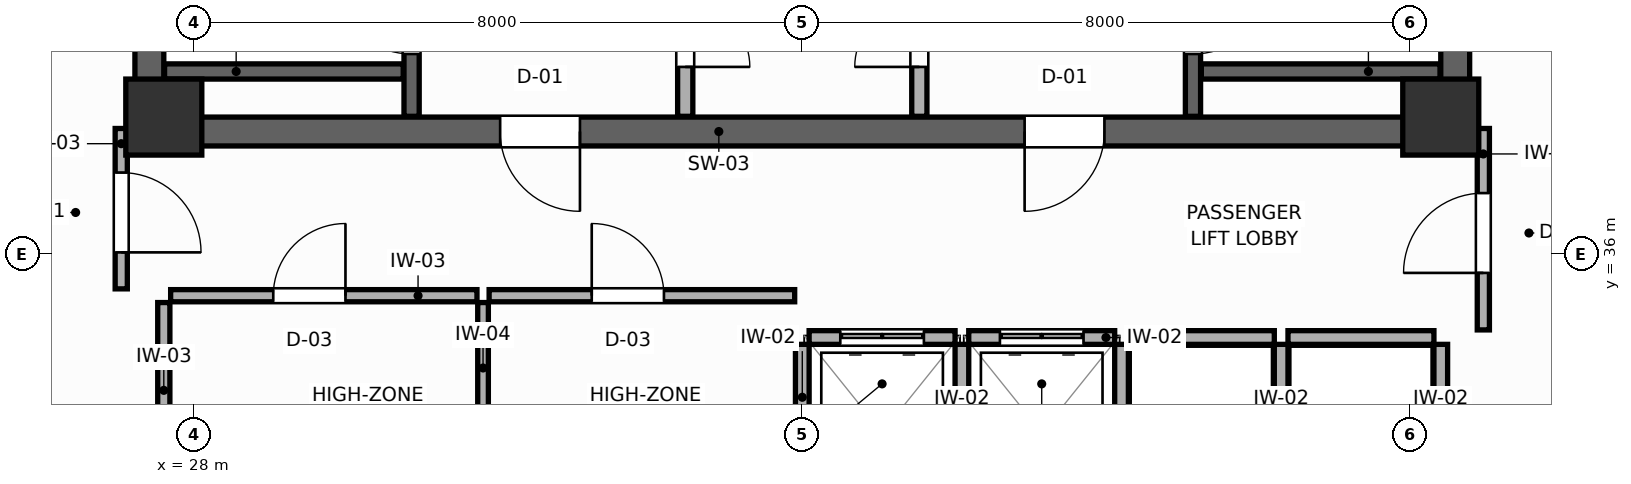
"""IFC4 building model, lengths in metres.
Left out: names, types, materials, properties, quantities, classifications, styles, units other than length and angle.
Written with IfcOpenShell. Run it as: python <this file> out.ifc"""

import sys

from ifc_helpers import new_model, si_unit, direction, frame, frame_2d, origin, origin_2d, place, context, subcontext, project, spatial, rectangle, extrude, source, transform, mapped, element, fill, save


model = new_model("IFC4")
c1 = context("Model", 3, precision=1e-05, world=origin(), true_north=direction((0.0, 1.0)))
c2 = subcontext(c1, "Body", "Model", "MODEL_VIEW")
j1 = project(units=[si_unit("LENGTHUNIT", "METRE"), si_unit("PLANEANGLEUNIT", "RADIAN")], contexts=[c1])
p1 = place(None, origin())
s1 = spatial("IfcSite", under=j1, at=p1, CompositionType="ELEMENT")
p2 = place(p1, origin())
s2 = spatial("IfcBuilding", under=s1, at=p2, CompositionType="ELEMENT")
p3 = place(p2, frame((0.0, 0.0, 220.2)))
s3 = spatial("IfcBuildingStorey", under=s2, at=p3, CompositionType="ELEMENT", Elevation=220.2)
p4 = place(p3, frame((27.22, 37.61, 0.0), z_axis=(0.0, 0.0, 1.0), x_axis=(1.0, 0.0, 0.0)))
e1 = element("IfcWall", 1, at=p4, inside=s3, PredefinedType="SHEAR", context=c2, shape_type="SweptSolid", body=[
    extrude(rectangle(XDim=17.56, YDim=0.38, at=frame_2d((8.78, 0.0))), origin(), (0.0, 0.0, 1.0), 3.6),
])
p5 = place(p4, frame((4.805, 0.0, 0.0)))
e2 = element("IfcOpeningElement", 2, at=p5, cuts=e1, PredefinedType="OPENING", context=c2, shape_type="SweptSolid", body=[
    extrude(rectangle(XDim=1.05, YDim=2.1, at=frame_2d((0.525, 1.05))), frame((0.0, 0.2, 0.0), z_axis=(0.0, -1.0, 0.0), x_axis=(1.0, 0.0, 0.0)), (0.0, 0.0, 1.0), 0.4),
])
p6 = place(p4, frame((11.705, 0.0, 0.0)))
e3 = element("IfcOpeningElement", 3, at=p6, cuts=e1, PredefinedType="OPENING", context=c2, shape_type="SweptSolid", body=[
    extrude(rectangle(XDim=1.05, YDim=2.1, at=frame_2d((0.525, 1.05))), frame((0.0, 0.2, 0.0), z_axis=(0.0, -1.0, 0.0), x_axis=(1.0, 0.0, 0.0)), (0.0, 0.0, 1.0), 0.4),
])
for number, where, z_axis, x_axis in (
    (4, (27.41, 37.8, 0.0), (0.0, 0.0, 1.0), (0.0, 1.0, 0.0)),
    (5, (44.59, 37.8, 0.0), (0.0, 0.0, 1.0), (0.0, 1.0, 0.0)),
):
    element("IfcWall", number, at=place(p3, frame(where, z_axis=z_axis, x_axis=x_axis)), inside=s3, PredefinedType="SHEAR", context=c2, shape_type="SweptSolid", body=[
        extrude(rectangle(XDim=9.0, YDim=0.38, at=frame_2d((4.5, 0.0))), origin(), (0.0, 0.0, 1.0), 3.6),
    ])
m1 = source(origin(), c2, "Body", "SweptSolid", [
    extrude(rectangle(XDim=1.0, YDim=1.0, at=origin_2d()), origin(), (0.0, 0.0, 1.0), 3.6),
])
for number, where, z_axis, x_axis in (
    (6, (27.6, 37.8, 0.0), (0.0, 0.0, 1.0), (1.0, 0.0, 0.0)),
    (7, (44.4, 37.8, 0.0), (0.0, 0.0, 1.0), (1.0, 0.0, 0.0)),
):
    element("IfcColumn", number, at=place(p3, frame(where, z_axis=z_axis, x_axis=x_axis)), inside=s3, PredefinedType="COLUMN", context=c2, shape_type="MappedRepresentation", body=[
        mapped(m1, transform((0.0, 0.0, 0.0), scale=1.0)),
    ])
p7 = place(p3, frame((30.86, 37.81, 0.0), z_axis=(0.0, 0.0, 1.0), x_axis=(0.0, 1.0, 0.0)))
e8 = element("IfcWall", 8, at=p7, inside=s3, PredefinedType="SHEAR", context=c2, shape_type="SweptSolid", body=[
    extrude(rectangle(XDim=8.98, YDim=0.2, at=frame_2d((4.49, 0.0))), origin(), (0.0, 0.0, 1.0), 3.6),
])
p8 = place(p7, frame((0.82, 0.0, 0.0)))
e9 = element("IfcOpeningElement", 9, at=p8, cuts=e8, PredefinedType="OPENING", context=c2, shape_type="SweptSolid", body=[
    extrude(rectangle(XDim=1.05, YDim=2.1, at=frame_2d((0.525, 1.05))), frame((0.0, 0.11, 0.0), z_axis=(0.0, -1.0, 0.0), x_axis=(1.0, 0.0, 0.0)), (0.0, 0.0, 1.0), 0.22),
])
p9 = place(p3, frame((27.61, 38.4, 0.0), z_axis=(0.0, 0.0, 1.0), x_axis=(1.0, 0.0, 0.0)))
e10 = element("IfcWall", 10, at=p9, inside=s3, PredefinedType="SHEAR", context=c2, shape_type="SweptSolid", body=[
    extrude(rectangle(XDim=3.14, YDim=0.2, at=frame_2d((1.57, 0.0))), origin(), (0.0, 0.0, 1.0), 3.6),
])
p10 = place(p3, frame((41.14, 37.81, 0.0), z_axis=(0.0, 0.0, 1.0), x_axis=(0.0, 1.0, 0.0)))
e11 = element("IfcWall", 11, at=p10, inside=s3, PredefinedType="SHEAR", context=c2, shape_type="SweptSolid", body=[
    extrude(rectangle(XDim=8.98, YDim=0.2, at=frame_2d((4.49, 0.0))), origin(), (0.0, 0.0, 1.0), 3.6),
])
p11 = place(p10, frame((0.82, 0.0, 0.0)))
e12 = element("IfcOpeningElement", 12, at=p11, cuts=e11, PredefinedType="OPENING", context=c2, shape_type="SweptSolid", body=[
    extrude(rectangle(XDim=1.05, YDim=2.1, at=frame_2d((0.525, 1.05))), frame((0.0, 0.11, 0.0), z_axis=(0.0, -1.0, 0.0), x_axis=(1.0, 0.0, 0.0)), (0.0, 0.0, 1.0), 0.22),
])
p12 = place(p3, frame((41.25, 38.4, 0.0), z_axis=(0.0, 0.0, 1.0), x_axis=(1.0, 0.0, 0.0)))
e13 = element("IfcWall", 13, at=p12, inside=s3, PredefinedType="SHEAR", context=c2, shape_type="SweptSolid", body=[
    extrude(rectangle(XDim=3.14, YDim=0.2, at=frame_2d((1.57, 0.0))), origin(), (0.0, 0.0, 1.0), 3.6),
])
p13 = place(p3, frame((34.46, 37.81, 0.0), z_axis=(0.0, 0.0, 1.0), x_axis=(0.0, 1.0, 0.0)))
e14 = element("IfcWall", 14, at=p13, inside=s3, PredefinedType="PARTITIONING", context=c2, shape_type="SweptSolid", body=[
    extrude(rectangle(XDim=8.98, YDim=0.2, at=frame_2d((4.49, 0.0))), origin(), (0.0, 0.0, 1.0), 3.41),
])
p14 = place(p13, frame((0.65, 0.0, 0.0)))
e15 = element("IfcOpeningElement", 15, at=p14, cuts=e14, PredefinedType="OPENING", context=c2, shape_type="SweptSolid", body=[
    extrude(rectangle(XDim=0.85, YDim=2.05, at=frame_2d((0.425, 1.025))), frame((0.0, 0.11, 0.0), z_axis=(0.0, -1.0, 0.0), x_axis=(1.0, 0.0, 0.0)), (0.0, 0.0, 1.0), 0.22),
])
p15 = place(p3, frame((37.54, 37.81, 0.0), z_axis=(0.0, 0.0, 1.0), x_axis=(0.0, 1.0, 0.0)))
e16 = element("IfcWall", 16, at=p15, inside=s3, PredefinedType="PARTITIONING", context=c2, shape_type="SweptSolid", body=[
    extrude(rectangle(XDim=8.98, YDim=0.2, at=frame_2d((4.49, 0.0))), origin(), (0.0, 0.0, 1.0), 3.41),
])
p16 = place(p15, frame((0.65, 0.0, 0.0)))
e17 = element("IfcOpeningElement", 17, at=p16, cuts=e16, PredefinedType="OPENING", context=c2, shape_type="SweptSolid", body=[
    extrude(rectangle(XDim=0.85, YDim=2.05, at=frame_2d((0.425, 1.025))), frame((0.0, 0.11, 0.0), z_axis=(0.0, -1.0, 0.0), x_axis=(1.0, 0.0, 0.0)), (0.0, 0.0, 1.0), 0.22),
])
p17 = place(p3, frame((36.09, 34.9, 0.0), z_axis=(0.0, 0.0, 1.0), x_axis=(1.0, 0.0, 0.0)))
e18 = element("IfcWall", 18, at=p17, inside=s3, PredefinedType="PARTITIONING", context=c2, shape_type="SweptSolid", body=[
    extrude(rectangle(XDim=1.92, YDim=0.18, at=frame_2d((0.96, 0.0))), origin(), (0.0, 0.0, 1.0), 3.41),
])
p18 = place(p17, frame((0.41, 0.0, 0.0)))
e19 = element("IfcOpeningElement", 19, at=p18, cuts=e18, PredefinedType="OPENING", context=c2, shape_type="SweptSolid", body=[
    extrude(rectangle(XDim=1.1, YDim=2.1, at=frame_2d((0.55, 1.05))), frame((0.0, 0.1, 0.0), z_axis=(0.0, -1.0, 0.0), x_axis=(1.0, 0.0, 0.0)), (0.0, 0.0, 1.0), 0.2),
])
p19 = place(p3, frame((36.0, 32.49, 0.0), z_axis=(0.0, 0.0, 1.0), x_axis=(0.0, 1.0, 0.0)))
e20 = element("IfcWall", 20, at=p19, inside=s3, PredefinedType="PARTITIONING", context=c2, shape_type="SweptSolid", body=[
    extrude(rectangle(XDim=2.32, YDim=0.18, at=frame_2d((1.16, 0.0))), origin(), (0.0, 0.0, 1.0), 3.41),
])
p20 = place(p3, frame((38.19, 34.9, 0.0), z_axis=(0.0, 0.0, 1.0), x_axis=(1.0, 0.0, 0.0)))
e21 = element("IfcWall", 21, at=p20, inside=s3, PredefinedType="PARTITIONING", context=c2, shape_type="SweptSolid", body=[
    extrude(rectangle(XDim=1.92, YDim=0.18, at=frame_2d((0.96, 0.0))), origin(), (0.0, 0.0, 1.0), 3.41),
])
p21 = place(p20, frame((0.41, 0.0, 0.0)))
e22 = element("IfcOpeningElement", 22, at=p21, cuts=e21, PredefinedType="OPENING", context=c2, shape_type="SweptSolid", body=[
    extrude(rectangle(XDim=1.1, YDim=2.1, at=frame_2d((0.55, 1.05))), frame((0.0, 0.1, 0.0), z_axis=(0.0, -1.0, 0.0), x_axis=(1.0, 0.0, 0.0)), (0.0, 0.0, 1.0), 0.2),
])
p22 = place(p3, frame((38.1, 32.49, 0.0), z_axis=(0.0, 0.0, 1.0), x_axis=(0.0, 1.0, 0.0)))
e23 = element("IfcWall", 23, at=p22, inside=s3, PredefinedType="PARTITIONING", context=c2, shape_type="SweptSolid", body=[
    extrude(rectangle(XDim=2.32, YDim=0.18, at=frame_2d((1.16, 0.0))), origin(), (0.0, 0.0, 1.0), 3.41),
])
p23 = place(p3, frame((40.29, 34.9, 0.0), z_axis=(0.0, 0.0, 1.0), x_axis=(1.0, 0.0, 0.0)))
e24 = element("IfcWall", 24, at=p23, inside=s3, PredefinedType="PARTITIONING", context=c2, shape_type="SweptSolid", body=[
    extrude(rectangle(XDim=1.92, YDim=0.18, at=frame_2d((0.96, 0.0))), origin(), (0.0, 0.0, 1.0), 3.41),
])
p24 = place(p3, frame((40.2, 32.49, 0.0), z_axis=(0.0, 0.0, 1.0), x_axis=(0.0, 1.0, 0.0)))
e25 = element("IfcWall", 25, at=p24, inside=s3, PredefinedType="PARTITIONING", context=c2, shape_type="SweptSolid", body=[
    extrude(rectangle(XDim=2.32, YDim=0.18, at=frame_2d((1.16, 0.0))), origin(), (0.0, 0.0, 1.0), 3.41),
])
p25 = place(p3, frame((42.39, 34.9, 0.0), z_axis=(0.0, 0.0, 1.0), x_axis=(1.0, 0.0, 0.0)))
e26 = element("IfcWall", 26, at=p25, inside=s3, PredefinedType="PARTITIONING", context=c2, shape_type="SweptSolid", body=[
    extrude(rectangle(XDim=1.92, YDim=0.18, at=frame_2d((0.96, 0.0))), origin(), (0.0, 0.0, 1.0), 3.41),
])
for number, where, z_axis, x_axis in (
    (27, (42.3, 32.49, 0.0), (0.0, 0.0, 1.0), (0.0, 1.0, 0.0)),
    (28, (44.4, 32.49, 0.0), (0.0, 0.0, 1.0), (0.0, 1.0, 0.0)),
):
    element("IfcWall", number, at=place(p3, frame(where, z_axis=z_axis, x_axis=x_axis)), inside=s3, PredefinedType="PARTITIONING", context=c2, shape_type="SweptSolid", body=[
        extrude(rectangle(XDim=2.32, YDim=0.18, at=frame_2d((1.16, 0.0))), origin(), (0.0, 0.0, 1.0), 3.41),
    ])
p26 = place(p3, frame((27.6, 33.05, 0.0), z_axis=(0.0, 0.0, 1.0), x_axis=(0.0, 1.0, 0.0)))
e29 = element("IfcWall", 29, at=p26, inside=s3, PredefinedType="PARTITIONING", context=c2, shape_type="SweptSolid", body=[
    extrude(rectangle(XDim=2.31, YDim=0.16, at=frame_2d((1.155, 0.0))), origin(), (0.0, 0.0, 1.0), 3.41),
])
p27 = place(p3, frame((31.8, 32.49, 0.0), z_axis=(0.0, 0.0, 1.0), x_axis=(0.0, 1.0, 0.0)))
e30 = element("IfcWall", 30, at=p27, inside=s3, PredefinedType="PARTITIONING", context=c2, shape_type="SweptSolid", body=[
    extrude(rectangle(XDim=2.87, YDim=0.14, at=frame_2d((1.435, 0.0))), origin(), (0.0, 0.0, 1.0), 3.41),
])
p28 = place(p3, frame((27.69, 35.45, 0.0), z_axis=(0.0, 0.0, 1.0), x_axis=(1.0, 0.0, 0.0)))
e31 = element("IfcWall", 31, at=p28, inside=s3, PredefinedType="PARTITIONING", context=c2, shape_type="SweptSolid", body=[
    extrude(rectangle(XDim=4.03, YDim=0.16, at=frame_2d((2.015, 0.0))), origin(), (0.0, 0.0, 1.0), 3.41),
])
p29 = place(p28, frame((1.35, 0.0, 0.0)))
e32 = element("IfcOpeningElement", 32, at=p29, cuts=e31, PredefinedType="OPENING", context=c2, shape_type="SweptSolid", body=[
    extrude(rectangle(XDim=0.95, YDim=2.05, at=frame_2d((0.475, 1.025))), frame((0.0, 0.09, 0.0), z_axis=(0.0, -1.0, 0.0), x_axis=(1.0, 0.0, 0.0)), (0.0, 0.0, 1.0), 0.18),
])
p30 = place(p3, frame((31.88, 35.45, 0.0), z_axis=(0.0, 0.0, 1.0), x_axis=(1.0, 0.0, 0.0)))
e33 = element("IfcWall", 33, at=p30, inside=s3, PredefinedType="PARTITIONING", context=c2, shape_type="SweptSolid", body=[
    extrude(rectangle(XDim=4.02, YDim=0.16, at=frame_2d((2.01, 0.0))), origin(), (0.0, 0.0, 1.0), 3.41),
])
p31 = place(p30, frame((1.35, 0.0, 0.0)))
e34 = element("IfcOpeningElement", 34, at=p31, cuts=e33, PredefinedType="OPENING", context=c2, shape_type="SweptSolid", body=[
    extrude(rectangle(XDim=0.95, YDim=2.05, at=frame_2d((0.475, 1.025))), frame((0.0, 0.09, 0.0), z_axis=(0.0, -1.0, 0.0), x_axis=(1.0, 0.0, 0.0)), (0.0, 0.0, 1.0), 0.18),
])
p32 = place(p3, frame((27.04, 35.54, 0.0), z_axis=(0.0, 0.0, 1.0), x_axis=(0.0, 1.0, 0.0)))
e35 = element("IfcWall", 35, at=p32, inside=s3, PredefinedType="PARTITIONING", context=c2, shape_type="SweptSolid", body=[
    extrude(rectangle(XDim=2.11, YDim=0.16, at=frame_2d((1.055, 0.0))), origin(), (0.0, 0.0, 1.0), 3.41),
])
p33 = place(p32, frame((0.48, 0.0, 0.0)))
e36 = element("IfcOpeningElement", 36, at=p33, cuts=e35, PredefinedType="OPENING", context=c2, shape_type="SweptSolid", body=[
    extrude(rectangle(XDim=1.05, YDim=2.1, at=frame_2d((0.525, 1.05))), frame((0.0, 0.09, 0.0), z_axis=(0.0, -1.0, 0.0), x_axis=(1.0, 0.0, 0.0)), (0.0, 0.0, 1.0), 0.18),
])
p34 = place(p3, frame((44.96, 35.0, 0.0), z_axis=(0.0, 0.0, 1.0), x_axis=(0.0, 1.0, 0.0)))
e37 = element("IfcWall", 37, at=p34, inside=s3, PredefinedType="PARTITIONING", context=c2, shape_type="SweptSolid", body=[
    extrude(rectangle(XDim=2.65, YDim=0.16, at=frame_2d((1.325, 0.0))), origin(), (0.0, 0.0, 1.0), 3.41),
])
p35 = place(p34, frame((0.75, 0.0, 0.0)))
e38 = element("IfcOpeningElement", 38, at=p35, cuts=e37, PredefinedType="OPENING", context=c2, shape_type="SweptSolid", body=[
    extrude(rectangle(XDim=1.05, YDim=2.1, at=frame_2d((0.525, 1.05))), frame((0.0, 0.09, 0.0), z_axis=(0.0, -1.0, 0.0), x_axis=(1.0, 0.0, 0.0)), (0.0, 0.0, 1.0), 0.18),
])
p36 = place(p8, origin())
e39 = element("IfcDoor", 39, at=p36, inside=s3, OperationType="SINGLE_SWING_RIGHT", PredefinedType="DOOR", context=c2, shape_type="SweptSolid", body=[
    extrude(rectangle(XDim=1.05, YDim=2.1, at=frame_2d((0.525, 1.05))), frame((0.0, 0.025, 0.0), z_axis=(0.0, -1.0, 0.0), x_axis=(1.0, 0.0, 0.0)), (0.0, 0.0, 1.0), 0.05),
])
fill(e9, e39)
p37 = place(p11, frame((1.05, 0.0, 0.0), z_axis=(0.0, 0.0, 1.0), x_axis=(-1.0, 0.0, 0.0)))
e40 = element("IfcDoor", 40, at=p37, inside=s3, OperationType="SINGLE_SWING_LEFT", PredefinedType="DOOR", context=c2, shape_type="SweptSolid", body=[
    extrude(rectangle(XDim=1.05, YDim=2.1, at=frame_2d((0.525, 1.05))), frame((0.0, 0.025, 0.0), z_axis=(0.0, -1.0, 0.0), x_axis=(1.0, 0.0, 0.0)), (0.0, 0.0, 1.0), 0.05),
])
fill(e12, e40)
p38 = place(p14, frame((0.85, 0.0, 0.0), z_axis=(0.0, 0.0, 1.0), x_axis=(-1.0, 0.0, 0.0)))
e41 = element("IfcDoor", 41, at=p38, inside=s3, OperationType="SINGLE_SWING_RIGHT", PredefinedType="DOOR", context=c2, shape_type="SweptSolid", body=[
    extrude(rectangle(XDim=0.85, YDim=2.05, at=frame_2d((0.425, 1.025))), frame((0.0, 0.025, 0.0), z_axis=(0.0, -1.0, 0.0), x_axis=(1.0, 0.0, 0.0)), (0.0, 0.0, 1.0), 0.05),
])
fill(e15, e41)
p39 = place(p16, origin())
e42 = element("IfcDoor", 42, at=p39, inside=s3, OperationType="SINGLE_SWING_LEFT", PredefinedType="DOOR", context=c2, shape_type="SweptSolid", body=[
    extrude(rectangle(XDim=0.85, YDim=2.05, at=frame_2d((0.425, 1.025))), frame((0.0, 0.025, 0.0), z_axis=(0.0, -1.0, 0.0), x_axis=(1.0, 0.0, 0.0)), (0.0, 0.0, 1.0), 0.05),
])
fill(e17, e42)
p40 = place(p18, origin())
e43 = element("IfcDoor", 43, at=p40, inside=s3, OperationType="DOUBLE_DOOR_SLIDING", PredefinedType="DOOR", context=c2, shape_type="SweptSolid", body=[
    extrude(rectangle(XDim=1.1, YDim=2.1, at=frame_2d((0.55, 1.05))), frame((0.0, 0.025, 0.0), z_axis=(0.0, -1.0, 0.0), x_axis=(1.0, 0.0, 0.0)), (0.0, 0.0, 1.0), 0.05),
])
fill(e19, e43)
p41 = place(p21, origin())
e44 = element("IfcDoor", 44, at=p41, inside=s3, OperationType="DOUBLE_DOOR_SLIDING", PredefinedType="DOOR", context=c2, shape_type="SweptSolid", body=[
    extrude(rectangle(XDim=1.1, YDim=2.1, at=frame_2d((0.55, 1.05))), frame((0.0, 0.025, 0.0), z_axis=(0.0, -1.0, 0.0), x_axis=(1.0, 0.0, 0.0)), (0.0, 0.0, 1.0), 0.05),
])
fill(e22, e44)
p42 = place(p29, origin())
e45 = element("IfcDoor", 45, at=p42, inside=s3, OperationType="SINGLE_SWING_RIGHT", PredefinedType="DOOR", context=c2, shape_type="SweptSolid", body=[
    extrude(rectangle(XDim=0.95, YDim=2.05, at=frame_2d((0.475, 1.025))), frame((0.0, 0.025, 0.0), z_axis=(0.0, -1.0, 0.0), x_axis=(1.0, 0.0, 0.0)), (0.0, 0.0, 1.0), 0.05),
])
fill(e32, e45)
p43 = place(p31, origin())
e46 = element("IfcDoor", 46, at=p43, inside=s3, OperationType="SINGLE_SWING_LEFT", PredefinedType="DOOR", context=c2, shape_type="SweptSolid", body=[
    extrude(rectangle(XDim=0.95, YDim=2.05, at=frame_2d((0.475, 1.025))), frame((0.0, 0.025, 0.0), z_axis=(0.0, -1.0, 0.0), x_axis=(1.0, 0.0, 0.0)), (0.0, 0.0, 1.0), 0.05),
])
fill(e34, e46)
p44 = place(p33, frame((1.05, 0.0, 0.0), z_axis=(0.0, 0.0, 1.0), x_axis=(-1.0, 0.0, 0.0)))
e47 = element("IfcDoor", 47, at=p44, inside=s3, OperationType="SINGLE_SWING_RIGHT", PredefinedType="DOOR", context=c2, shape_type="SweptSolid", body=[
    extrude(rectangle(XDim=1.05, YDim=2.1, at=frame_2d((0.525, 1.05))), frame((0.0, 0.025, 0.0), z_axis=(0.0, -1.0, 0.0), x_axis=(1.0, 0.0, 0.0)), (0.0, 0.0, 1.0), 0.05),
])
fill(e36, e47)
p45 = place(p35, origin())
e48 = element("IfcDoor", 48, at=p45, inside=s3, OperationType="SINGLE_SWING_LEFT", PredefinedType="DOOR", context=c2, shape_type="SweptSolid", body=[
    extrude(rectangle(XDim=1.05, YDim=2.1, at=frame_2d((0.525, 1.05))), frame((0.0, 0.025, 0.0), z_axis=(0.0, -1.0, 0.0), x_axis=(1.0, 0.0, 0.0)), (0.0, 0.0, 1.0), 0.05),
])
fill(e38, e48)
p46 = place(p5, frame((1.05, 0.0, 0.0), z_axis=(0.0, 0.0, 1.0), x_axis=(-1.0, 0.0, 0.0)))
e49 = element("IfcDoor", 49, at=p46, inside=s3, OperationType="SINGLE_SWING_LEFT", PredefinedType="DOOR", context=c2, shape_type="SweptSolid", body=[
    extrude(rectangle(XDim=1.05, YDim=2.1, at=frame_2d((0.525, 1.05))), frame((0.0, 0.025, 0.0), z_axis=(0.0, -1.0, 0.0), x_axis=(1.0, 0.0, 0.0)), (0.0, 0.0, 1.0), 0.05),
])
fill(e2, e49)
p47 = place(p6, frame((1.05, 0.0, 0.0), z_axis=(0.0, 0.0, 1.0), x_axis=(-1.0, 0.0, 0.0)))
e50 = element("IfcDoor", 50, at=p47, inside=s3, OperationType="SINGLE_SWING_RIGHT", PredefinedType="DOOR", context=c2, shape_type="SweptSolid", body=[
    extrude(rectangle(XDim=1.05, YDim=2.1, at=frame_2d((0.525, 1.05))), frame((0.0, 0.025, 0.0), z_axis=(0.0, -1.0, 0.0), x_axis=(1.0, 0.0, 0.0)), (0.0, 0.0, 1.0), 0.05),
])
fill(e3, e50)
save(model, sys.argv[1])
